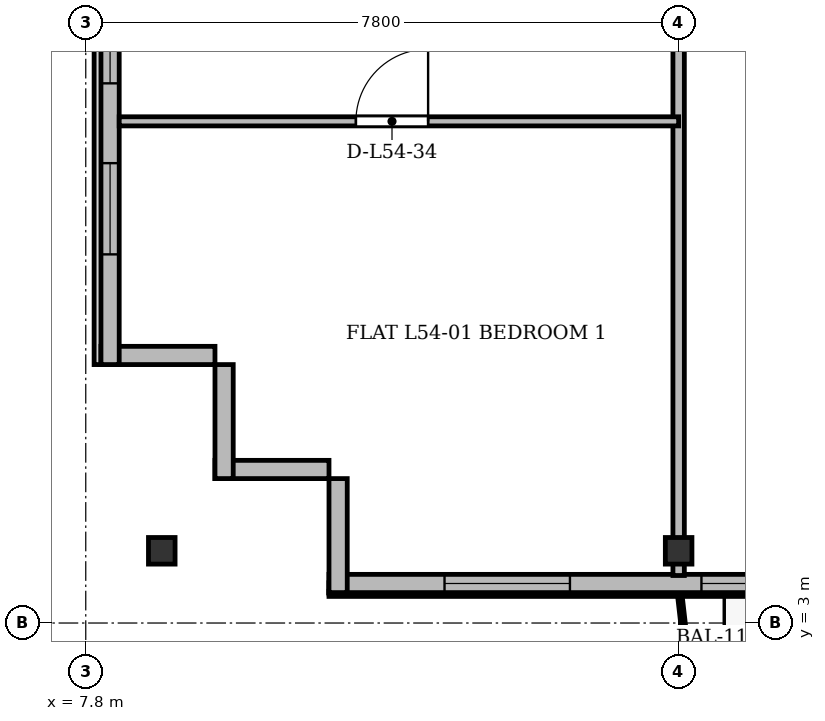
"""IFC4 building model, lengths in metres.
Left out: names, types, materials, properties, quantities, classifications, styles, units other than length and angle.
Written with IfcOpenShell. Run it as: python <this file> out.ifc"""

import sys

from ifc_helpers import new_model, si_unit, direction, frame, frame_2d, origin, origin_2d, place, context, subcontext, project, spatial, rectangle, i_section, extrude, source, transform, mapped, element, fill, save


model = new_model("IFC4")
c1 = context("Model", 3, precision=1e-05, world=origin(), true_north=direction((0.0, 1.0)))
c2 = subcontext(c1, "Body", "Model", "MODEL_VIEW")
j1 = project(units=[si_unit("LENGTHUNIT", "METRE"), si_unit("PLANEANGLEUNIT", "RADIAN")], contexts=[c1])
p1 = place(None, origin())
s1 = spatial("IfcSite", under=j1, at=p1, CompositionType="ELEMENT")
p2 = place(p1, origin())
s2 = spatial("IfcBuilding", under=s1, at=p2, CompositionType="ELEMENT")
p3 = place(p2, frame((0.0, 0.0, 208.5)))
s3 = spatial("IfcBuildingStorey", under=s2, at=p3, CompositionType="ELEMENT", Elevation=208.5)
m1 = source(origin(), c2, "Body", "SweptSolid", [
    extrude(i_section(OverallWidth=0.35, OverallDepth=0.35, WebThickness=0.018, FlangeThickness=0.028, at=origin_2d()), origin(), (0.0, 0.0, 1.0), 3.6),
])
for number, where, z_axis, x_axis in (
    (1, (8.8, 3.95, 0.0), (0.0, 0.0, 1.0), (1.0, 0.0, 0.0)),
    (2, (15.6, 3.95, 0.0), (0.0, 0.0, 1.0), (1.0, 0.0, 0.0)),
):
    element("IfcColumn", number, at=place(p3, frame(where, z_axis=z_axis, x_axis=x_axis)), inside=s3, PredefinedType="COLUMN", context=c2, shape_type="MappedRepresentation", body=[
        mapped(m1, transform((0.0, 0.0, 0.0), x_axis=(1.0, 0.0, 0.0), y_axis=(0.0, 1.0, 0.0), z_axis=(0.0, 0.0, 1.0), scale=1.0)),
    ])
for number, where, z_axis, x_axis in (
    (3, (11.0, 5.02, 0.0), (0.0, 0.0, 1.0), (-1.0, 0.0, 0.0)),
    (4, (9.62, 4.9, 0.0), (0.0, 0.0, 1.0), (0.0, 1.0, 0.0)),
):
    element("IfcWall", number, at=place(p3, frame(where, z_axis=z_axis, x_axis=x_axis)), inside=s3, PredefinedType="SOLIDWALL", context=c2, shape_type="SweptSolid", body=[
        extrude(rectangle(XDim=1.5, YDim=0.24, at=frame_2d((0.75, 0.0))), origin(), (0.0, 0.0, 1.0), 3.36),
    ])
p4 = place(p3, frame((9.5, 6.52, 0.0), z_axis=(0.0, 0.0, 1.0), x_axis=(-1.0, 0.0, 0.0)))
e5 = element("IfcWall", 5, at=p4, inside=s3, PredefinedType="SOLIDWALL", context=c2, shape_type="SweptSolid", body=[
    extrude(rectangle(XDim=1.5, YDim=0.24, at=frame_2d((0.75, 0.0))), origin(), (0.0, 0.0, 1.0), 2.86),
])
p5 = place(p3, frame((8.12, 6.4, 0.0), z_axis=(0.0, 0.0, 1.0), x_axis=(0.0, 1.0, 0.0)))
e6 = element("IfcWall", 6, at=p5, inside=s3, PredefinedType="SOLIDWALL", context=c2, shape_type="SweptSolid", body=[
    extrude(rectangle(XDim=39.1, YDim=0.24, at=frame_2d((19.55, 0.0))), origin(), (0.0, 0.0, 1.0), 3.36),
])
p6 = place(p5, frame((1.45, 0.0, 0.92)))
e7 = element("IfcOpeningElement", 7, at=p6, cuts=e6, PredefinedType="OPENING", context=c2, shape_type="SweptSolid", body=[
    extrude(rectangle(XDim=1.2, YDim=1.65, at=frame_2d((0.6, 0.825))), frame((0.0, 0.13, 0.0), z_axis=(0.0, -1.0, 0.0), x_axis=(1.0, 0.0, 0.0)), (0.0, 0.0, 1.0), 0.26),
])
p7 = place(p5, frame((3.7, 0.0, 0.92)))
e8 = element("IfcOpeningElement", 8, at=p7, cuts=e6, PredefinedType="OPENING", context=c2, shape_type="SweptSolid", body=[
    extrude(rectangle(XDim=2.6, YDim=1.9, at=frame_2d((1.3, 0.95))), frame((0.0, 0.13, 0.0), z_axis=(0.0, -1.0, 0.0), x_axis=(1.0, 0.0, 0.0)), (0.0, 0.0, 1.0), 0.26),
])
p8 = place(p5, frame((7.9, 0.0, 0.92)))
e9 = element("IfcOpeningElement", 9, at=p8, cuts=e6, PredefinedType="OPENING", context=c2, shape_type="SweptSolid", body=[
    extrude(rectangle(XDim=2.6, YDim=1.9, at=frame_2d((1.3, 0.95))), frame((0.0, 0.13, 0.0), z_axis=(0.0, -1.0, 0.0), x_axis=(1.0, 0.0, 0.0)), (0.0, 0.0, 1.0), 0.26),
])
p9 = place(p5, frame((15.1, 0.0, 0.92)))
e10 = element("IfcOpeningElement", 10, at=p9, cuts=e6, PredefinedType="OPENING", context=c2, shape_type="SweptSolid", body=[
    extrude(rectangle(XDim=2.6, YDim=1.9, at=frame_2d((1.3, 0.95))), frame((0.0, 0.13, 0.0), z_axis=(0.0, -1.0, 0.0), x_axis=(1.0, 0.0, 0.0)), (0.0, 0.0, 1.0), 0.26),
])
p10 = place(p5, frame((33.4, 0.0, 0.92)))
e11 = element("IfcOpeningElement", 11, at=p10, cuts=e6, PredefinedType="OPENING", context=c2, shape_type="SweptSolid", body=[
    extrude(rectangle(XDim=1.2, YDim=1.65, at=frame_2d((0.6, 0.825))), frame((0.0, 0.13, 0.0), z_axis=(0.0, -1.0, 0.0), x_axis=(1.0, 0.0, 0.0)), (0.0, 0.0, 1.0), 0.26),
])
p11 = place(p5, frame((36.75, 0.0, 0.92)))
e12 = element("IfcOpeningElement", 12, at=p11, cuts=e6, PredefinedType="OPENING", context=c2, shape_type="SweptSolid", body=[
    extrude(rectangle(XDim=1.2, YDim=1.65, at=frame_2d((0.6, 0.825))), frame((0.0, 0.13, 0.0), z_axis=(0.0, -1.0, 0.0), x_axis=(1.0, 0.0, 0.0)), (0.0, 0.0, 1.0), 0.26),
])
p12 = place(p3, frame((63.4, 3.52, 0.0), z_axis=(0.0, 0.0, 1.0), x_axis=(-1.0, 0.0, 0.0)))
e13 = element("IfcWall", 13, at=p12, inside=s3, PredefinedType="SOLIDWALL", context=c2, shape_type="SweptSolid", body=[
    extrude(rectangle(XDim=52.4, YDim=0.24, at=frame_2d((26.2, 0.0))), origin(), (0.0, 0.0, 1.0), 3.36),
])
p13 = place(p12, frame((1.52, 0.0, 0.9)))
e14 = element("IfcOpeningElement", 14, at=p13, cuts=e13, PredefinedType="OPENING", context=c2, shape_type="SweptSolid", body=[
    extrude(rectangle(XDim=1.65, YDim=1.85, at=frame_2d((0.825, 0.925))), frame((0.0, 0.13, 0.0), z_axis=(0.0, -1.0, 0.0), x_axis=(1.0, 0.0, 0.0)), (0.0, 0.0, 1.0), 0.26),
])
p14 = place(p12, frame((5.0, 0.0, 0.9)))
e15 = element("IfcOpeningElement", 15, at=p14, cuts=e13, PredefinedType="OPENING", context=c2, shape_type="SweptSolid", body=[
    extrude(rectangle(XDim=1.8, YDim=1.8, at=frame_2d((0.9, 0.9))), frame((0.0, 0.13, 0.0), z_axis=(0.0, -1.0, 0.0), x_axis=(1.0, 0.0, 0.0)), (0.0, 0.0, 1.0), 0.26),
])
p15 = place(p12, frame((7.45, 0.0, 0.9)))
e16 = element("IfcOpeningElement", 16, at=p15, cuts=e13, PredefinedType="OPENING", context=c2, shape_type="SweptSolid", body=[
    extrude(rectangle(XDim=1.5, YDim=1.75, at=frame_2d((0.75, 0.875))), frame((0.0, 0.13, 0.0), z_axis=(0.0, -1.0, 0.0), x_axis=(1.0, 0.0, 0.0)), (0.0, 0.0, 1.0), 0.26),
])
p16 = place(p12, frame((10.05, 0.0, 0.9)))
e17 = element("IfcOpeningElement", 17, at=p16, cuts=e13, PredefinedType="OPENING", context=c2, shape_type="SweptSolid", body=[
    extrude(rectangle(XDim=1.5, YDim=1.75, at=frame_2d((0.75, 0.875))), frame((0.0, 0.13, 0.0), z_axis=(0.0, -1.0, 0.0), x_axis=(1.0, 0.0, 0.0)), (0.0, 0.0, 1.0), 0.26),
])
p17 = place(p12, frame((14.217, 0.0, 0.0)))
e18 = element("IfcOpeningElement", 18, at=p17, cuts=e13, PredefinedType="OPENING", context=c2, shape_type="SweptSolid", body=[
    extrude(rectangle(XDim=1.2, YDim=2.2, at=frame_2d((0.6, 1.1))), frame((0.0, 0.13, 0.0), z_axis=(0.0, -1.0, 0.0), x_axis=(1.0, 0.0, 0.0)), (0.0, 0.0, 1.0), 0.26),
])
p18 = place(p12, frame((20.108, 0.0, 0.9)))
e19 = element("IfcOpeningElement", 19, at=p18, cuts=e13, PredefinedType="OPENING", context=c2, shape_type="SweptSolid", body=[
    extrude(rectangle(XDim=1.65, YDim=1.85, at=frame_2d((0.825, 0.925))), frame((0.0, 0.13, 0.0), z_axis=(0.0, -1.0, 0.0), x_axis=(1.0, 0.0, 0.0)), (0.0, 0.0, 1.0), 0.26),
])
p19 = place(p12, frame((22.7, 0.0, 0.9)))
e20 = element("IfcOpeningElement", 20, at=p19, cuts=e13, PredefinedType="OPENING", context=c2, shape_type="SweptSolid", body=[
    extrude(rectangle(XDim=1.8, YDim=1.8, at=frame_2d((0.9, 0.9))), frame((0.0, 0.13, 0.0), z_axis=(0.0, -1.0, 0.0), x_axis=(1.0, 0.0, 0.0)), (0.0, 0.0, 1.0), 0.26),
])
p20 = place(p12, frame((25.166, 0.0, 0.9)))
e21 = element("IfcOpeningElement", 21, at=p20, cuts=e13, PredefinedType="OPENING", context=c2, shape_type="SweptSolid", body=[
    extrude(rectangle(XDim=2.2, YDim=1.8, at=frame_2d((1.1, 0.9))), frame((0.0, 0.13, 0.0), z_axis=(0.0, -1.0, 0.0), x_axis=(1.0, 0.0, 0.0)), (0.0, 0.0, 1.0), 0.26),
])
p21 = place(p12, frame((29.45, 0.0, 0.9)))
e22 = element("IfcOpeningElement", 22, at=p21, cuts=e13, PredefinedType="OPENING", context=c2, shape_type="SweptSolid", body=[
    extrude(rectangle(XDim=1.5, YDim=1.75, at=frame_2d((0.75, 0.875))), frame((0.0, 0.13, 0.0), z_axis=(0.0, -1.0, 0.0), x_axis=(1.0, 0.0, 0.0)), (0.0, 0.0, 1.0), 0.26),
])
p22 = place(p12, frame((33.0, 0.0, 0.9)))
e23 = element("IfcOpeningElement", 23, at=p22, cuts=e13, PredefinedType="OPENING", context=c2, shape_type="SweptSolid", body=[
    extrude(rectangle(XDim=2.0, YDim=1.95, at=frame_2d((1.0, 0.975))), frame((0.0, 0.13, 0.0), z_axis=(0.0, -1.0, 0.0), x_axis=(1.0, 0.0, 0.0)), (0.0, 0.0, 1.0), 0.26),
])
p23 = place(p12, frame((35.575, 0.0, 0.9)))
e24 = element("IfcOpeningElement", 24, at=p23, cuts=e13, PredefinedType="OPENING", context=c2, shape_type="SweptSolid", body=[
    extrude(rectangle(XDim=1.65, YDim=1.85, at=frame_2d((0.825, 0.925))), frame((0.0, 0.13, 0.0), z_axis=(0.0, -1.0, 0.0), x_axis=(1.0, 0.0, 0.0)), (0.0, 0.0, 1.0), 0.26),
])
p24 = place(p12, frame((37.9, 0.0, 0.9)))
e25 = element("IfcOpeningElement", 25, at=p24, cuts=e13, PredefinedType="OPENING", context=c2, shape_type="SweptSolid", body=[
    extrude(rectangle(XDim=1.8, YDim=1.8, at=frame_2d((0.9, 0.9))), frame((0.0, 0.13, 0.0), z_axis=(0.0, -1.0, 0.0), x_axis=(1.0, 0.0, 0.0)), (0.0, 0.0, 1.0), 0.26),
])
p25 = place(p12, frame((41.456, 0.0, 0.0)))
e26 = element("IfcOpeningElement", 26, at=p25, cuts=e13, PredefinedType="OPENING", context=c2, shape_type="SweptSolid", body=[
    extrude(rectangle(XDim=1.2, YDim=2.2, at=frame_2d((0.6, 1.1))), frame((0.0, 0.13, 0.0), z_axis=(0.0, -1.0, 0.0), x_axis=(1.0, 0.0, 0.0)), (0.0, 0.0, 1.0), 0.26),
])
p26 = place(p12, frame((43.45, 0.0, 0.9)))
e27 = element("IfcOpeningElement", 27, at=p26, cuts=e13, PredefinedType="OPENING", context=c2, shape_type="SweptSolid", body=[
    extrude(rectangle(XDim=1.5, YDim=1.75, at=frame_2d((0.75, 0.875))), frame((0.0, 0.13, 0.0), z_axis=(0.0, -1.0, 0.0), x_axis=(1.0, 0.0, 0.0)), (0.0, 0.0, 1.0), 0.26),
])
p27 = place(p12, frame((45.5, 0.0, 0.9)))
e28 = element("IfcOpeningElement", 28, at=p27, cuts=e13, PredefinedType="OPENING", context=c2, shape_type="SweptSolid", body=[
    extrude(rectangle(XDim=2.0, YDim=1.95, at=frame_2d((1.0, 0.975))), frame((0.0, 0.13, 0.0), z_axis=(0.0, -1.0, 0.0), x_axis=(1.0, 0.0, 0.0)), (0.0, 0.0, 1.0), 0.26),
])
p28 = place(p12, frame((49.23, 0.0, 0.9)))
e29 = element("IfcOpeningElement", 29, at=p28, cuts=e13, PredefinedType="OPENING", context=c2, shape_type="SweptSolid", body=[
    extrude(rectangle(XDim=1.65, YDim=1.85, at=frame_2d((0.825, 0.925))), frame((0.0, 0.13, 0.0), z_axis=(0.0, -1.0, 0.0), x_axis=(1.0, 0.0, 0.0)), (0.0, 0.0, 1.0), 0.26),
])
p29 = place(p3, frame((11.12, 3.4, 0.0), z_axis=(0.0, 0.0, 1.0), x_axis=(0.0, 1.0, 0.0)))
e30 = element("IfcWall", 30, at=p29, inside=s3, PredefinedType="SOLIDWALL", context=c2, shape_type="SweptSolid", body=[
    extrude(rectangle(XDim=1.5, YDim=0.24, at=frame_2d((0.75, 0.0))), origin(), (0.0, 0.0, 1.0), 2.91),
])
p30 = place(p3, frame((15.6, 3.625, 0.0), z_axis=(0.0, 0.0, 1.0), x_axis=(0.0, 1.0, 0.0)))
e31 = element("IfcWall", 31, at=p30, inside=s3, PredefinedType="PARTITIONING", context=c2, shape_type="SweptSolid", body=[
    extrude(rectangle(XDim=27.175, YDim=0.15, at=frame_2d((13.587, 0.0))), origin(), (0.0, 0.0, 1.0), 2.86),
])
p31 = place(p3, frame((8.24, 9.6, 0.0), z_axis=(0.0, 0.0, 1.0), x_axis=(1.0, 0.0, 0.0)))
e32 = element("IfcWall", 32, at=p31, inside=s3, PredefinedType="PARTITIONING", context=c2, shape_type="SweptSolid", body=[
    extrude(rectangle(XDim=7.36, YDim=0.12, at=frame_2d((3.68, 0.0))), origin(), (0.0, 0.0, 1.0), 2.86),
])
p32 = place(p31, frame((3.114, 0.0, 0.0)))
e33 = element("IfcOpeningElement", 33, at=p32, cuts=e32, PredefinedType="OPENING", context=c2, shape_type="SweptSolid", body=[
    extrude(rectangle(XDim=0.95, YDim=2.15, at=frame_2d((0.475, 1.075))), frame((0.0, 0.07, 0.0), z_axis=(0.0, -1.0, 0.0), x_axis=(1.0, 0.0, 0.0)), (0.0, 0.0, 1.0), 0.14),
])
m2 = source(origin(), c2, "Body", "SweptSolid", [
    extrude(rectangle(XDim=1.2, YDim=1.65, at=frame_2d((0.6, 0.825))), frame((0.0, 0.03, 0.0), z_axis=(0.0, -1.0, 0.0), x_axis=(1.0, 0.0, 0.0)), (0.0, 0.0, 1.0), 0.06),
])
p33 = place(p6, origin())
e34 = element("IfcWindow", 34, at=p33, inside=s3, PartitioningType="SINGLE_PANEL", PredefinedType="WINDOW", context=c2, shape_type="MappedRepresentation", body=[
    mapped(m2, transform((0.0, 0.0, 0.0), x_axis=(1.0, 0.0, 0.0), y_axis=(0.0, 1.0, 0.0), z_axis=(0.0, 0.0, 1.0), scale=1.0)),
])
fill(e7, e34)
m3 = source(origin(), c2, "Body", "SweptSolid", [
    extrude(rectangle(XDim=2.6, YDim=1.9, at=frame_2d((1.3, 0.95))), frame((0.0, 0.03, 0.0), z_axis=(0.0, -1.0, 0.0), x_axis=(1.0, 0.0, 0.0)), (0.0, 0.0, 1.0), 0.06),
])
p34 = place(p7, origin())
e35 = element("IfcWindow", 35, at=p34, inside=s3, PartitioningType="SINGLE_PANEL", PredefinedType="WINDOW", context=c2, shape_type="MappedRepresentation", body=[
    mapped(m3, transform((0.0, 0.0, 0.0), x_axis=(1.0, 0.0, 0.0), y_axis=(0.0, 1.0, 0.0), z_axis=(0.0, 0.0, 1.0), scale=1.0)),
])
fill(e8, e35)
m4 = source(origin(), c2, "Body", "SweptSolid", [
    extrude(rectangle(XDim=2.0, YDim=1.95, at=frame_2d((1.0, 0.975))), frame((0.0, 0.03, 0.0), z_axis=(0.0, -1.0, 0.0), x_axis=(1.0, 0.0, 0.0)), (0.0, 0.0, 1.0), 0.06),
])
p35 = place(p27, origin())
e36 = element("IfcWindow", 36, at=p35, inside=s3, PartitioningType="SINGLE_PANEL", PredefinedType="WINDOW", context=c2, shape_type="MappedRepresentation", body=[
    mapped(m4, transform((0.0, 0.0, 0.0), x_axis=(1.0, 0.0, 0.0), y_axis=(0.0, 1.0, 0.0), z_axis=(0.0, 0.0, 1.0), scale=1.0)),
])
fill(e28, e36)
m5 = source(origin(), c2, "Body", "SweptSolid", [
    extrude(rectangle(XDim=1.65, YDim=1.85, at=frame_2d((0.825, 0.925))), frame((0.0, 0.03, 0.0), z_axis=(0.0, -1.0, 0.0), x_axis=(1.0, 0.0, 0.0)), (0.0, 0.0, 1.0), 0.06),
])
p36 = place(p28, origin())
e37 = element("IfcWindow", 37, at=p36, inside=s3, PartitioningType="SINGLE_PANEL", PredefinedType="WINDOW", context=c2, shape_type="MappedRepresentation", body=[
    mapped(m5, transform((0.0, 0.0, 0.0), x_axis=(1.0, 0.0, 0.0), y_axis=(0.0, 1.0, 0.0), z_axis=(0.0, 0.0, 1.0), scale=1.0)),
])
fill(e29, e37)
m6 = source(origin(), c2, "Body", "SweptSolid", [
    extrude(rectangle(XDim=0.95, YDim=2.15, at=frame_2d((0.475, 1.075))), frame((0.0, 0.025, 0.0), z_axis=(0.0, -1.0, 0.0), x_axis=(1.0, 0.0, 0.0)), (0.0, 0.0, 1.0), 0.05),
])
p37 = place(p32, origin())
e38 = element("IfcDoor", 38, at=p37, inside=s3, OperationType="SINGLE_SWING_RIGHT", PredefinedType="DOOR", context=c2, shape_type="MappedRepresentation", body=[
    mapped(m6, transform((0.0, 0.0, 0.0), x_axis=(1.0, 0.0, 0.0), y_axis=(0.0, 1.0, 0.0), z_axis=(0.0, 0.0, 1.0), scale=1.0)),
])
fill(e33, e38)
save(model, sys.argv[1])
